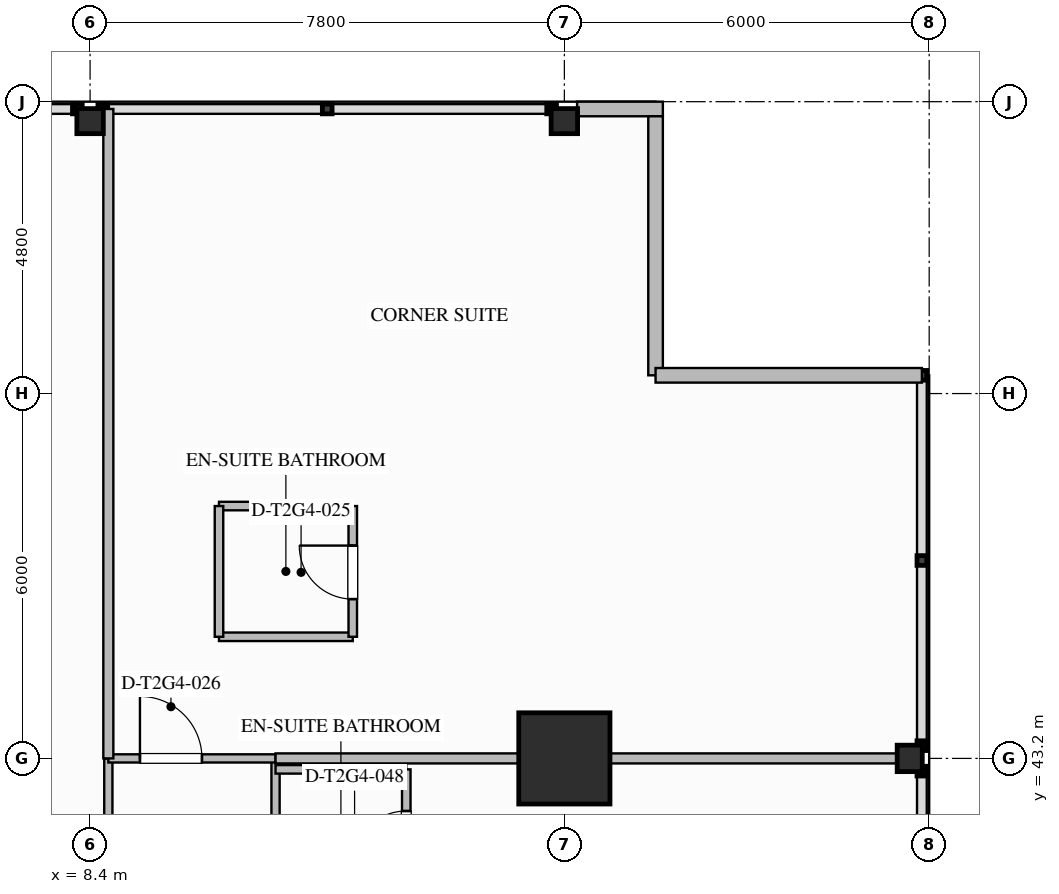
"""IFC4 building model, lengths in metres.
Left out: names, types, materials, properties, quantities, classifications, styles, units other than length and angle.
Written with IfcOpenShell. Run it as: python <this file> out.ifc"""

import sys

from ifc_helpers import new_model, si_unit, direction, frame, frame_2d, origin, origin_2d, place, context, subcontext, project, spatial, rectangle, i_section, extrude, element, fill, save


model = new_model("IFC4")
c1 = context("Model", 3, precision=1e-05, world=origin(), true_north=direction((0.0, 1.0)))
c2 = subcontext(c1, "Body", "Model", "MODEL_VIEW")
j1 = project(units=[si_unit("LENGTHUNIT", "METRE"), si_unit("PLANEANGLEUNIT", "RADIAN")], contexts=[c1])
p1 = place(None, origin())
s1 = spatial("IfcSite", under=j1, at=p1, CompositionType="ELEMENT")
p2 = place(p1, origin())
s2 = spatial("IfcBuilding", under=s1, at=p2, CompositionType="ELEMENT")
p3 = place(p2, frame((0.0, 0.0, 123.3)))
s3 = spatial("IfcBuildingStorey", under=s2, at=p3, CompositionType="ELEMENT", Elevation=123.3)
p4 = place(p3, frame((16.2, 43.2, 0.0), z_axis=(0.0, 0.0, 1.0), x_axis=(1.0, 0.0, 0.0)))
e1 = element("IfcColumn", 1, at=p4, inside=s3, PredefinedType="COLUMN", context=c2, shape_type="SweptSolid", body=[
    extrude(rectangle(XDim=1.5, YDim=1.5, at=origin_2d()), origin(), (0.0, 0.0, 1.0), 3.5),
])
for number, where, z_axis, x_axis in (
    (2, (21.88, 43.2, 0.0), (0.0, 0.0, 1.0), (1.0, 0.0, 0.0)),
    (3, (8.4, 53.68, 0.0), (0.0, 0.0, 1.0), (0.0, 1.0, 0.0)),
    (4, (16.2, 53.68, 0.0), (0.0, 0.0, 1.0), (0.0, 1.0, 0.0)),
):
    element("IfcColumn", number, at=place(p3, frame(where, z_axis=z_axis, x_axis=x_axis)), inside=s3, PredefinedType="COLUMN", context=c2, shape_type="SweptSolid", body=[
        extrude(i_section(OverallWidth=0.412, OverallDepth=0.435, WebThickness=0.036, FlangeThickness=0.057, FilletRadius=0.028, at=origin_2d()), origin(), (0.0, 0.0, 1.0), 3.497),
    ])
p5 = place(p3, frame((16.409, 53.88, 0.0), z_axis=(0.0, 0.0, 1.0), x_axis=(1.0, 0.0, 0.0)))
e5 = element("IfcWall", 5, at=p5, inside=s3, PredefinedType="STANDARD", context=c2, shape_type="SweptSolid", body=[
    extrude(rectangle(XDim=1.411, YDim=0.24, at=frame_2d((0.705, 0.0))), origin(), (0.0, 0.0, 1.0), 3.24),
])
p6 = place(p3, frame((17.7, 53.76, 0.0), z_axis=(0.0, 0.0, 1.0), x_axis=(0.0, -1.0, 0.0)))
e6 = element("IfcWall", 6, at=p6, inside=s3, PredefinedType="STANDARD", context=c2, shape_type="SweptSolid", body=[
    extrude(rectangle(XDim=4.26, YDim=0.24, at=frame_2d((2.13, 0.0))), origin(), (0.0, 0.0, 1.0), 3.24),
])
p7 = place(p3, frame((17.7, 49.5, 0.0), z_axis=(0.0, 0.0, 1.0), x_axis=(1.0, 0.0, 0.0)))
e7 = element("IfcWall", 7, at=p7, inside=s3, PredefinedType="STANDARD", context=c2, shape_type="SweptSolid", body=[
    extrude(rectangle(XDim=4.38, YDim=0.24, at=frame_2d((2.19, 0.0))), origin(), (0.0, 0.0, 1.0), 3.24),
])
p8 = place(p3, frame((8.7, 38.65, 0.0), z_axis=(0.0, 0.0, 1.0), x_axis=(0.0, 1.0, 0.0)))
e8 = element("IfcWall", 8, at=p8, inside=s3, PredefinedType="PARTITIONING", context=c2, shape_type="SweptSolid", body=[
    extrude(rectangle(XDim=4.55, YDim=0.135, at=frame_2d((2.275, 0.0))), origin(), (0.0, 0.0, 1.0), 3.24),
])
p9 = place(p3, frame((11.45, 10.8, 0.0), z_axis=(0.0, 0.0, 1.0), x_axis=(0.0, 1.0, 0.0)))
e9 = element("IfcWall", 9, at=p9, inside=s3, PredefinedType="PARTITIONING", context=c2, shape_type="SweptSolid", body=[
    extrude(rectangle(XDim=32.4, YDim=0.135, at=frame_2d((16.2, 0.0))), origin(), (0.0, 0.0, 1.0), 3.24),
])
p10 = place(p9, frame((1.963, 0.0, 0.0)))
e10 = element("IfcOpeningElement", 10, at=p10, cuts=e9, PredefinedType="OPENING", context=c2, shape_type="SweptSolid", body=[
    extrude(rectangle(XDim=0.96, YDim=2.15, at=frame_2d((0.48, 1.075))), frame((0.0, 0.077, 0.0), z_axis=(0.0, -1.0, 0.0), x_axis=(1.0, 0.0, 0.0)), (0.0, 0.0, 1.0), 0.155),
])
p11 = place(p9, frame((8.234, 0.0, 0.0)))
e11 = element("IfcOpeningElement", 11, at=p11, cuts=e9, PredefinedType="OPENING", context=c2, shape_type="SweptSolid", body=[
    extrude(rectangle(XDim=0.96, YDim=2.15, at=frame_2d((0.48, 1.075))), frame((0.0, 0.077, 0.0), z_axis=(0.0, -1.0, 0.0), x_axis=(1.0, 0.0, 0.0)), (0.0, 0.0, 1.0), 0.155),
])
p12 = place(p9, frame((14.244, 0.0, 0.0)))
e12 = element("IfcOpeningElement", 12, at=p12, cuts=e9, PredefinedType="OPENING", context=c2, shape_type="SweptSolid", body=[
    extrude(rectangle(XDim=0.96, YDim=2.15, at=frame_2d((0.48, 1.075))), frame((0.0, 0.077, 0.0), z_axis=(0.0, -1.0, 0.0), x_axis=(1.0, 0.0, 0.0)), (0.0, 0.0, 1.0), 0.155),
])
p13 = place(p9, frame((20.253, 0.0, 0.0)))
e13 = element("IfcOpeningElement", 13, at=p13, cuts=e9, PredefinedType="OPENING", context=c2, shape_type="SweptSolid", body=[
    extrude(rectangle(XDim=0.96, YDim=2.15, at=frame_2d((0.48, 1.075))), frame((0.0, 0.077, 0.0), z_axis=(0.0, -1.0, 0.0), x_axis=(1.0, 0.0, 0.0)), (0.0, 0.0, 1.0), 0.155),
])
p14 = place(p9, frame((26.636, 0.0, 0.0)))
e14 = element("IfcOpeningElement", 14, at=p14, cuts=e9, PredefinedType="OPENING", context=c2, shape_type="SweptSolid", body=[
    extrude(rectangle(XDim=1.26, YDim=2.2, at=frame_2d((0.63, 1.1))), frame((0.0, 0.077, 0.0), z_axis=(0.0, -1.0, 0.0), x_axis=(1.0, 0.0, 0.0)), (0.0, 0.0, 1.0), 0.155),
])
p15 = place(p3, frame((8.7, 43.2, 0.0), z_axis=(0.0, 0.0, 1.0), x_axis=(1.0, 0.0, 0.0)))
e15 = element("IfcWall", 15, at=p15, inside=s3, PredefinedType="PARTITIONING", context=c2, shape_type="SweptSolid", body=[
    extrude(rectangle(XDim=2.75, YDim=0.135, at=frame_2d((1.375, 0.0))), origin(), (0.0, 0.0, 1.0), 2.53),
])
p16 = place(p15, frame((0.52, 0.0, 0.0)))
e16 = element("IfcOpeningElement", 16, at=p16, cuts=e15, PredefinedType="OPENING", context=c2, shape_type="SweptSolid", body=[
    extrude(rectangle(XDim=1.02, YDim=2.15, at=frame_2d((0.51, 1.075))), frame((0.0, 0.077, 0.0), z_axis=(0.0, -1.0, 0.0), x_axis=(1.0, 0.0, 0.0)), (0.0, 0.0, 1.0), 0.155),
])
p17 = place(p3, frame((8.7, 43.2, 0.0), z_axis=(0.0, 0.0, 1.0), x_axis=(0.0, 1.0, 0.0)))
e17 = element("IfcWall", 17, at=p17, inside=s3, PredefinedType="PARTITIONING", context=c2, shape_type="SweptSolid", body=[
    extrude(rectangle(XDim=10.68, YDim=0.165, at=frame_2d((5.34, 0.0))), origin(), (0.0, 0.0, 1.0), 2.53),
])
p18 = place(p3, frame((11.45, 43.2, 0.0), z_axis=(0.0, 0.0, 1.0), x_axis=(1.0, 0.0, 0.0)))
e18 = element("IfcWall", 18, at=p18, inside=s3, PredefinedType="PARTITIONING", context=c2, shape_type="SweptSolid", body=[
    extrude(rectangle(XDim=10.63, YDim=0.165, at=frame_2d((5.315, 0.0))), origin(), (0.0, 0.0, 1.0), 2.53),
])
for number, where, z_axis, x_axis in (
    (19, (10.52, 45.2, 0.0), (0.0, 0.0, 1.0), (1.0, 0.0, 0.0)),
    (20, (10.52, 47.35, 0.0), (0.0, 0.0, 1.0), (1.0, 0.0, 0.0)),
):
    element("IfcWall", number, at=place(p3, frame(where, z_axis=z_axis, x_axis=x_axis)), inside=s3, PredefinedType="PLUMBINGWALL", context=c2, shape_type="SweptSolid", body=[
        extrude(rectangle(XDim=2.2, YDim=0.14, at=frame_2d((1.1, 0.0))), origin(), (0.0, 0.0, 1.0), 3.24),
    ])
p19 = place(p3, frame((10.52, 45.2, 0.0), z_axis=(0.0, 0.0, 1.0), x_axis=(0.0, 1.0, 0.0)))
e21 = element("IfcWall", 21, at=p19, inside=s3, PredefinedType="PLUMBINGWALL", context=c2, shape_type="SweptSolid", body=[
    extrude(rectangle(XDim=2.15, YDim=0.14, at=frame_2d((1.075, 0.0))), origin(), (0.0, 0.0, 1.0), 3.24),
])
p20 = place(p3, frame((12.72, 45.2, 0.0), z_axis=(0.0, 0.0, 1.0), x_axis=(0.0, 1.0, 0.0)))
e22 = element("IfcWall", 22, at=p20, inside=s3, PredefinedType="PLUMBINGWALL", context=c2, shape_type="SweptSolid", body=[
    extrude(rectangle(XDim=2.15, YDim=0.14, at=frame_2d((1.075, 0.0))), origin(), (0.0, 0.0, 1.0), 3.24),
])
p21 = place(p20, frame((0.62, 0.0, 0.0)))
e23 = element("IfcOpeningElement", 23, at=p21, cuts=e22, PredefinedType="OPENING", context=c2, shape_type="SweptSolid", body=[
    extrude(rectangle(XDim=0.88, YDim=2.1, at=frame_2d((0.44, 1.05))), frame((0.0, 0.08, 0.0), z_axis=(0.0, -1.0, 0.0), x_axis=(1.0, 0.0, 0.0)), (0.0, 0.0, 1.0), 0.16),
])
p22 = place(p3, frame((11.45, 43.02, 0.0), z_axis=(0.0, 0.0, 1.0), x_axis=(1.0, 0.0, 0.0)))
e24 = element("IfcWall", 24, at=p22, inside=s3, PredefinedType="PLUMBINGWALL", context=c2, shape_type="SweptSolid", body=[
    extrude(rectangle(XDim=2.15, YDim=0.14, at=frame_2d((1.075, 0.0))), origin(), (0.0, 0.0, 1.0), 2.53),
])
p23 = place(p3, frame((13.6, 40.77, 0.0), z_axis=(0.0, 0.0, 1.0), x_axis=(0.0, 1.0, 0.0)))
e25 = element("IfcWall", 25, at=p23, inside=s3, PredefinedType="PLUMBINGWALL", context=c2, shape_type="SweptSolid", body=[
    extrude(rectangle(XDim=2.25, YDim=0.14, at=frame_2d((1.125, 0.0))), origin(), (0.0, 0.0, 1.0), 3.24),
])
p24 = place(p23, frame((0.685, 0.0, 0.0)))
e26 = element("IfcOpeningElement", 26, at=p24, cuts=e25, PredefinedType="OPENING", context=c2, shape_type="SweptSolid", body=[
    extrude(rectangle(XDim=0.88, YDim=2.1, at=frame_2d((0.44, 1.05))), frame((0.0, 0.08, 0.0), z_axis=(0.0, -1.0, 0.0), x_axis=(1.0, 0.0, 0.0)), (0.0, 0.0, 1.0), 0.16),
])
p25 = place(p21, origin())
e27 = element("IfcDoor", 27, at=p25, inside=s3, OperationType="SINGLE_SWING_RIGHT", PredefinedType="DOOR", context=c2, shape_type="SweptSolid", body=[
    extrude(rectangle(XDim=0.88, YDim=2.1, at=frame_2d((0.44, 1.05))), frame((0.0, 0.025, 0.0), z_axis=(0.0, -1.0, 0.0), x_axis=(1.0, 0.0, 0.0)), (0.0, 0.0, 1.0), 0.05),
])
fill(e23, e27)
p26 = place(p16, origin())
e28 = element("IfcDoor", 28, at=p26, inside=s3, OperationType="SINGLE_SWING_LEFT", PredefinedType="DOOR", context=c2, shape_type="SweptSolid", body=[
    extrude(rectangle(XDim=1.02, YDim=2.15, at=frame_2d((0.51, 1.075))), frame((0.0, 0.025, 0.0), z_axis=(0.0, -1.0, 0.0), x_axis=(1.0, 0.0, 0.0)), (0.0, 0.0, 1.0), 0.05),
])
fill(e16, e28)
p27 = place(p24, origin())
e29 = element("IfcDoor", 29, at=p27, inside=s3, OperationType="SINGLE_SWING_LEFT", PredefinedType="DOOR", context=c2, shape_type="SweptSolid", body=[
    extrude(rectangle(XDim=0.88, YDim=2.1, at=frame_2d((0.44, 1.05))), frame((0.0, 0.025, 0.0), z_axis=(0.0, -1.0, 0.0), x_axis=(1.0, 0.0, 0.0)), (0.0, 0.0, 1.0), 0.05),
])
fill(e26, e29)
save(model, sys.argv[1])
